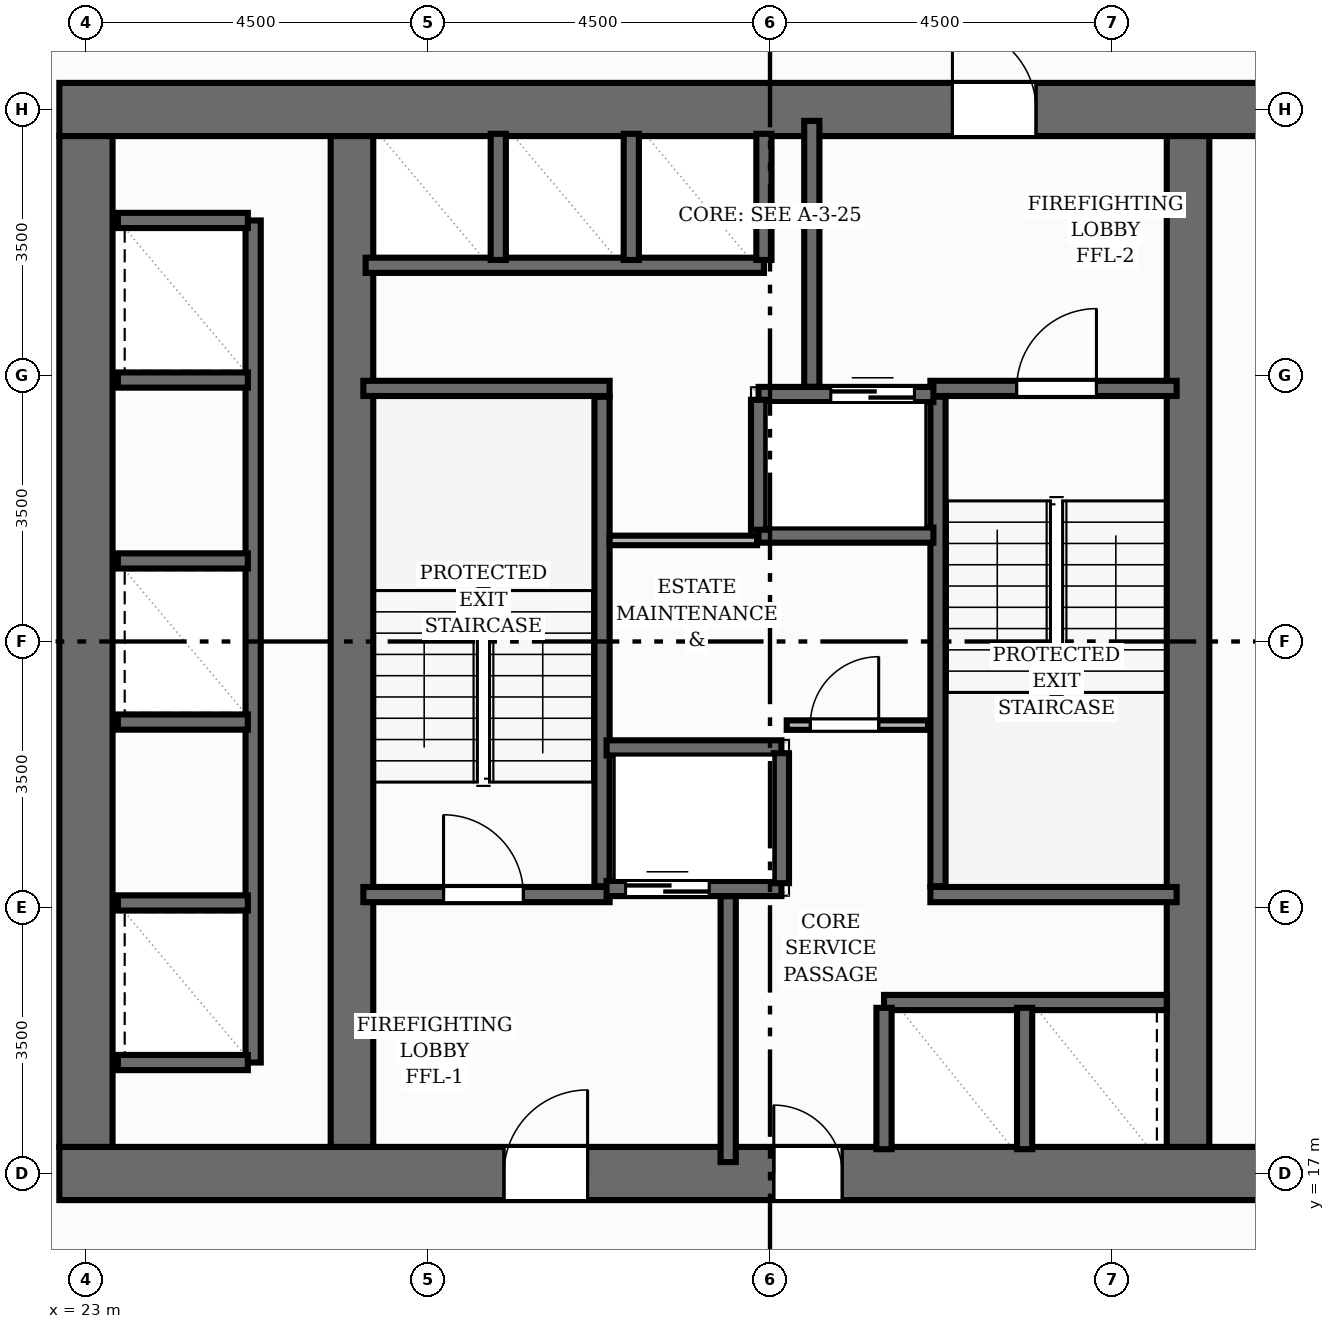
"""IFC4 building model, lengths in metres.
Left out: names, types, materials, properties, quantities, classifications, styles, units other than length and angle.
Written with IfcOpenShell. Run it as: python <this file> out.ifc"""

import sys

from ifc_helpers import new_model, si_unit, direction, frame, frame_2d, origin, place, context, subcontext, project, spatial, rectangle, extrude, element, fill, save


model = new_model("IFC4")
c1 = context("Model", 3, precision=1e-05, world=origin(), true_north=direction((0.0, 1.0)))
c2 = subcontext(c1, "Body", "Model", "MODEL_VIEW")
j1 = project(units=[si_unit("LENGTHUNIT", "METRE"), si_unit("PLANEANGLEUNIT", "RADIAN")], contexts=[c1])
p1 = place(None, origin())
s1 = spatial("IfcSite", under=j1, at=p1, CompositionType="ELEMENT")
p2 = place(p1, origin())
s2 = spatial("IfcBuilding", under=s1, at=p2, CompositionType="ELEMENT")
p3 = place(p2, frame((0.0, 0.0, 96.48)))
s3 = spatial("IfcBuildingStorey", under=s2, at=p3, CompositionType="ELEMENT", Elevation=96.48)
p4 = place(p3, frame((22.65, 17.0, 0.0), z_axis=(0.0, 0.0, 1.0), x_axis=(1.0, 0.0, 0.0)))
e1 = element("IfcWall", 1, at=p4, inside=s3, PredefinedType="SHEAR", context=c2, shape_type="SweptSolid", body=[
    extrude(rectangle(XDim=18.7, YDim=0.7, at=frame_2d((9.35, 0.0))), origin(), (0.0, 0.0, 1.0), 3.2),
])
p5 = place(p4, frame((5.85, 0.0, 0.0)))
e2 = element("IfcOpeningElement", 2, at=p5, cuts=e1, PredefinedType="OPENING", context=c2, shape_type="SweptSolid", body=[
    extrude(rectangle(XDim=1.1, YDim=2.15, at=frame_2d((0.55, 1.075))), frame((0.0, 0.36, 0.0), z_axis=(0.0, -1.0, 0.0), x_axis=(1.0, 0.0, 0.0)), (0.0, 0.0, 1.0), 0.72),
])
p6 = place(p4, frame((9.4, 0.0, 0.0)))
e3 = element("IfcOpeningElement", 3, at=p6, cuts=e1, PredefinedType="OPENING", context=c2, shape_type="SweptSolid", body=[
    extrude(rectangle(XDim=0.9, YDim=2.1, at=frame_2d((0.45, 1.05))), frame((0.0, 0.36, 0.0), z_axis=(0.0, -1.0, 0.0), x_axis=(1.0, 0.0, 0.0)), (0.0, 0.0, 1.0), 0.72),
])
p7 = place(p3, frame((22.65, 31.0, 0.0), z_axis=(0.0, 0.0, 1.0), x_axis=(1.0, 0.0, 0.0)))
e4 = element("IfcWall", 4, at=p7, inside=s3, PredefinedType="SHEAR", context=c2, shape_type="SweptSolid", body=[
    extrude(rectangle(XDim=18.7, YDim=0.7, at=frame_2d((9.35, 0.0))), origin(), (0.0, 0.0, 1.0), 3.2),
])
p8 = place(p7, frame((11.75, 0.0, 0.0)))
e5 = element("IfcOpeningElement", 5, at=p8, cuts=e4, PredefinedType="OPENING", context=c2, shape_type="SweptSolid", body=[
    extrude(rectangle(XDim=1.1, YDim=2.15, at=frame_2d((0.55, 1.075))), frame((0.0, 0.36, 0.0), z_axis=(0.0, -1.0, 0.0), x_axis=(1.0, 0.0, 0.0)), (0.0, 0.0, 1.0), 0.72),
])
p9 = place(p3, frame((23.0, 17.35, 0.0), z_axis=(0.0, 0.0, 1.0), x_axis=(0.0, 1.0, 0.0)))
e6 = element("IfcWall", 6, at=p9, inside=s3, PredefinedType="SHEAR", context=c2, shape_type="SweptSolid", body=[
    extrude(rectangle(XDim=13.3, YDim=0.7, at=frame_2d((6.65, 0.0))), origin(), (0.0, 0.0, 1.0), 3.2),
])
for number, where, z_axis, x_axis in (
    (7, (26.5, 17.35, 0.0), (0.0, 0.0, 1.0), (0.0, 1.0, 0.0)),
    (8, (37.5, 17.35, 0.0), (0.0, 0.0, 1.0), (0.0, 1.0, 0.0)),
):
    element("IfcWall", number, at=place(p3, frame(where, z_axis=z_axis, x_axis=x_axis)), inside=s3, PredefinedType="SHEAR", context=c2, shape_type="SweptSolid", body=[
        extrude(rectangle(XDim=13.3, YDim=0.56, at=frame_2d((6.65, 0.0))), origin(), (0.0, 0.0, 1.0), 3.2),
    ])
p10 = place(p3, frame((29.79, 20.78, 0.0), z_axis=(0.0, 0.0, 1.0), x_axis=(0.0, 1.0, 0.0)))
e9 = element("IfcWall", 9, at=p10, inside=s3, PredefinedType="SHEAR", context=c2, shape_type="SweptSolid", body=[
    extrude(rectangle(XDim=6.44, YDim=0.2, at=frame_2d((3.22, 0.0))), origin(), (0.0, 0.0, 1.0), 3.2),
])
p11 = place(p3, frame((26.65, 27.33, 0.0), z_axis=(0.0, 0.0, 1.0), x_axis=(1.0, 0.0, 0.0)))
e10 = element("IfcWall", 10, at=p11, inside=s3, PredefinedType="SHEAR", context=c2, shape_type="SweptSolid", body=[
    extrude(rectangle(XDim=3.24, YDim=0.2, at=frame_2d((1.62, 0.0))), origin(), (0.0, 0.0, 1.0), 3.2),
])
p12 = place(p3, frame((26.65, 20.67, 0.0), z_axis=(0.0, 0.0, 1.0), x_axis=(1.0, 0.0, 0.0)))
e11 = element("IfcWall", 11, at=p12, inside=s3, PredefinedType="SHEAR", context=c2, shape_type="SweptSolid", body=[
    extrude(rectangle(XDim=3.24, YDim=0.2, at=frame_2d((1.62, 0.0))), origin(), (0.0, 0.0, 1.0), 3.2),
])
p13 = place(p12, frame((1.055, 0.0, 0.0)))
e12 = element("IfcOpeningElement", 12, at=p13, cuts=e11, PredefinedType="OPENING", context=c2, shape_type="SweptSolid", body=[
    extrude(rectangle(XDim=1.05, YDim=2.15, at=frame_2d((0.525, 1.075))), frame((0.0, 0.11, 0.0), z_axis=(0.0, -1.0, 0.0), x_axis=(1.0, 0.0, 0.0)), (0.0, 0.0, 1.0), 0.22),
])
p14 = place(p3, frame((34.21, 20.78, 0.0), z_axis=(0.0, 0.0, 1.0), x_axis=(0.0, 1.0, 0.0)))
e13 = element("IfcWall", 13, at=p14, inside=s3, PredefinedType="SHEAR", context=c2, shape_type="SweptSolid", body=[
    extrude(rectangle(XDim=6.44, YDim=0.2, at=frame_2d((3.22, 0.0))), origin(), (0.0, 0.0, 1.0), 3.2),
])
p15 = place(p3, frame((34.11, 20.67, 0.0), z_axis=(0.0, 0.0, 1.0), x_axis=(1.0, 0.0, 0.0)))
e14 = element("IfcWall", 14, at=p15, inside=s3, PredefinedType="SHEAR", context=c2, shape_type="SweptSolid", body=[
    extrude(rectangle(XDim=3.24, YDim=0.2, at=frame_2d((1.62, 0.0))), origin(), (0.0, 0.0, 1.0), 3.2),
])
p16 = place(p3, frame((34.11, 27.33, 0.0), z_axis=(0.0, 0.0, 1.0), x_axis=(1.0, 0.0, 0.0)))
e15 = element("IfcWall", 15, at=p16, inside=s3, PredefinedType="SHEAR", context=c2, shape_type="SweptSolid", body=[
    extrude(rectangle(XDim=3.24, YDim=0.2, at=frame_2d((1.62, 0.0))), origin(), (0.0, 0.0, 1.0), 3.2),
])
p17 = place(p16, frame((1.135, 0.0, 0.0)))
e16 = element("IfcOpeningElement", 16, at=p17, cuts=e15, PredefinedType="OPENING", context=c2, shape_type="SweptSolid", body=[
    extrude(rectangle(XDim=1.05, YDim=2.15, at=frame_2d((0.525, 1.075))), frame((0.0, 0.11, 0.0), z_axis=(0.0, -1.0, 0.0), x_axis=(1.0, 0.0, 0.0)), (0.0, 0.0, 1.0), 0.22),
])
for number, where, z_axis, x_axis in (
    (17, (31.45, 17.15, 0.0), (0.0, 0.0, 1.0), (0.0, 1.0, 0.0)),
    (18, (32.55, 27.35, 0.0), (0.0, 0.0, 1.0), (0.0, 1.0, 0.0)),
):
    element("IfcWall", number, at=place(p3, frame(where, z_axis=z_axis, x_axis=x_axis)), inside=s3, PredefinedType="SHEAR", context=c2, shape_type="SweptSolid", body=[
        extrude(rectangle(XDim=3.5, YDim=0.2, at=frame_2d((1.75, 0.0))), origin(), (0.0, 0.0, 1.0), 3.2),
    ])
p18 = place(p3, frame((29.85, 20.75, 0.0), z_axis=(0.0, 0.0, 1.0), x_axis=(1.0, 0.0, 0.0)))
e19 = element("IfcWall", 19, at=p18, inside=s3, PredefinedType="SHEAR", context=c2, shape_type="SweptSolid", body=[
    extrude(rectangle(XDim=2.3, YDim=0.2, at=frame_2d((1.15, 0.0))), origin(), (0.0, 0.0, 1.0), 3.2),
])
p19 = place(p18, frame((0.25, 0.0, 0.0)))
e20 = element("IfcOpeningElement", 20, at=p19, cuts=e19, PredefinedType="OPENING", context=c2, shape_type="SweptSolid", body=[
    extrude(rectangle(XDim=1.1, YDim=2.15, at=frame_2d((0.55, 1.075))), frame((0.0, 0.11, 0.0), z_axis=(0.0, -1.0, 0.0), x_axis=(1.0, 0.0, 0.0)), (0.0, 0.0, 1.0), 0.22),
])
p20 = place(p3, frame((29.85, 22.6, 0.0), z_axis=(0.0, 0.0, 1.0), x_axis=(1.0, 0.0, 0.0)))
e21 = element("IfcWall", 21, at=p20, inside=s3, PredefinedType="SHEAR", context=c2, shape_type="SweptSolid", body=[
    extrude(rectangle(XDim=2.3, YDim=0.2, at=frame_2d((1.15, 0.0))), origin(), (0.0, 0.0, 1.0), 3.2),
])
p21 = place(p3, frame((32.15, 20.82, 0.0), z_axis=(0.0, 0.0, 1.0), x_axis=(0.0, 1.0, 0.0)))
e22 = element("IfcWall", 22, at=p21, inside=s3, PredefinedType="SHEAR", context=c2, shape_type="SweptSolid", body=[
    extrude(rectangle(XDim=1.71, YDim=0.2, at=frame_2d((0.855, 0.0))), origin(), (0.0, 0.0, 1.0), 3.2),
])
p22 = place(p3, frame((31.85, 27.25, 0.0), z_axis=(0.0, 0.0, 1.0), x_axis=(1.0, 0.0, 0.0)))
e23 = element("IfcWall", 23, at=p22, inside=s3, PredefinedType="SHEAR", context=c2, shape_type="SweptSolid", body=[
    extrude(rectangle(XDim=2.3, YDim=0.2, at=frame_2d((1.15, 0.0))), origin(), (0.0, 0.0, 1.0), 3.2),
])
p23 = place(p22, frame((0.95, 0.0, 0.0)))
e24 = element("IfcOpeningElement", 24, at=p23, cuts=e23, PredefinedType="OPENING", context=c2, shape_type="SweptSolid", body=[
    extrude(rectangle(XDim=1.1, YDim=2.15, at=frame_2d((0.55, 1.075))), frame((0.0, 0.11, 0.0), z_axis=(0.0, -1.0, 0.0), x_axis=(1.0, 0.0, 0.0)), (0.0, 0.0, 1.0), 0.22),
])
p24 = place(p3, frame((31.85, 25.4, 0.0), z_axis=(0.0, 0.0, 1.0), x_axis=(1.0, 0.0, 0.0)))
e25 = element("IfcWall", 25, at=p24, inside=s3, PredefinedType="SHEAR", context=c2, shape_type="SweptSolid", body=[
    extrude(rectangle(XDim=2.3, YDim=0.2, at=frame_2d((1.15, 0.0))), origin(), (0.0, 0.0, 1.0), 3.2),
])
p25 = place(p3, frame((31.85, 25.47, 0.0), z_axis=(0.0, 0.0, 1.0), x_axis=(0.0, 1.0, 0.0)))
e26 = element("IfcWall", 26, at=p25, inside=s3, PredefinedType="SHEAR", context=c2, shape_type="SweptSolid", body=[
    extrude(rectangle(XDim=1.71, YDim=0.2, at=frame_2d((0.855, 0.0))), origin(), (0.0, 0.0, 1.0), 3.2),
])
p26 = place(p3, frame((25.2, 18.46, 0.0), z_axis=(0.0, 0.0, 1.0), x_axis=(0.0, 1.0, 0.0)))
e27 = element("IfcWall", 27, at=p26, inside=s3, PredefinedType="SHEAR", context=c2, shape_type="SweptSolid", body=[
    extrude(rectangle(XDim=11.08, YDim=0.2, at=frame_2d((5.54, 0.0))), origin(), (0.0, 0.0, 1.0), 3.2),
])
for number, where, z_axis, x_axis in (
    (28, (23.42, 18.46, 0.0), (0.0, 0.0, 1.0), (1.0, 0.0, 0.0)),
    (29, (23.42, 29.54, 0.0), (0.0, 0.0, 1.0), (1.0, 0.0, 0.0)),
    (30, (23.42, 20.56, 0.0), (0.0, 0.0, 1.0), (1.0, 0.0, 0.0)),
    (31, (23.42, 22.94, 0.0), (0.0, 0.0, 1.0), (1.0, 0.0, 0.0)),
    (32, (23.42, 25.06, 0.0), (0.0, 0.0, 1.0), (1.0, 0.0, 0.0)),
    (33, (23.42, 27.44, 0.0), (0.0, 0.0, 1.0), (1.0, 0.0, 0.0)),
):
    element("IfcWall", number, at=place(p3, frame(where, z_axis=z_axis, x_axis=x_axis)), inside=s3, PredefinedType="SHEAR", context=c2, shape_type="SweptSolid", body=[
        extrude(rectangle(XDim=1.71, YDim=0.2, at=frame_2d((0.855, 0.0))), origin(), (0.0, 0.0, 1.0), 3.2),
    ])
p27 = place(p3, frame((26.68, 28.95, 0.0), z_axis=(0.0, 0.0, 1.0), x_axis=(1.0, 0.0, 0.0)))
e34 = element("IfcWall", 34, at=p27, inside=s3, PredefinedType="SHEAR", context=c2, shape_type="SweptSolid", body=[
    extrude(rectangle(XDim=5.24, YDim=0.2, at=frame_2d((2.62, 0.0))), origin(), (0.0, 0.0, 1.0), 3.2),
])
for number, where, z_axis, x_axis in (
    (35, (31.92, 29.02, 0.0), (0.0, 0.0, 1.0), (0.0, 1.0, 0.0)),
    (36, (28.425, 29.02, 0.0), (0.0, 0.0, 1.0), (0.0, 1.0, 0.0)),
    (37, (30.175, 29.02, 0.0), (0.0, 0.0, 1.0), (0.0, 1.0, 0.0)),
):
    element("IfcWall", number, at=place(p3, frame(where, z_axis=z_axis, x_axis=x_axis)), inside=s3, PredefinedType="SHEAR", context=c2, shape_type="SweptSolid", body=[
        extrude(rectangle(XDim=1.66, YDim=0.2, at=frame_2d((0.83, 0.0))), origin(), (0.0, 0.0, 1.0), 3.2),
    ])
p28 = place(p3, frame((33.5, 19.25, 0.0), z_axis=(0.0, 0.0, 1.0), x_axis=(1.0, 0.0, 0.0)))
e38 = element("IfcWall", 38, at=p28, inside=s3, PredefinedType="SHEAR", context=c2, shape_type="SweptSolid", body=[
    extrude(rectangle(XDim=3.72, YDim=0.2, at=frame_2d((1.86, 0.0))), origin(), (0.0, 0.0, 1.0), 3.2),
])
for number, where, z_axis, x_axis in (
    (39, (33.5, 17.32, 0.0), (0.0, 0.0, 1.0), (0.0, 1.0, 0.0)),
    (40, (35.35, 17.32, 0.0), (0.0, 0.0, 1.0), (0.0, 1.0, 0.0)),
):
    element("IfcWall", number, at=place(p3, frame(where, z_axis=z_axis, x_axis=x_axis)), inside=s3, PredefinedType="SHEAR", context=c2, shape_type="SweptSolid", body=[
        extrude(rectangle(XDim=1.86, YDim=0.2, at=frame_2d((0.93, 0.0))), origin(), (0.0, 0.0, 1.0), 3.2),
    ])
p29 = place(p3, frame((32.22, 22.9, 0.0), z_axis=(0.0, 0.0, 1.0), x_axis=(1.0, 0.0, 0.0)))
e41 = element("IfcWall", 41, at=p29, inside=s3, PredefinedType="PARTITIONING", context=c2, shape_type="SweptSolid", body=[
    extrude(rectangle(XDim=1.86, YDim=0.125, at=frame_2d((0.93, 0.0))), origin(), (0.0, 0.0, 1.0), 2.955),
])
p30 = place(p29, frame((0.31, 0.0, 0.0)))
e42 = element("IfcOpeningElement", 42, at=p30, cuts=e41, PredefinedType="OPENING", context=c2, shape_type="SweptSolid", body=[
    extrude(rectangle(XDim=0.9, YDim=2.1, at=frame_2d((0.45, 1.05))), frame((0.0, 0.073, 0.0), z_axis=(0.0, -1.0, 0.0), x_axis=(1.0, 0.0, 0.0)), (0.0, 0.0, 1.0), 0.145),
])
p31 = place(p3, frame((29.89, 25.33, 0.0), z_axis=(0.0, 0.0, 1.0), x_axis=(1.0, 0.0, 0.0)))
e43 = element("IfcWall", 43, at=p31, inside=s3, PredefinedType="PARTITIONING", context=c2, shape_type="SweptSolid", body=[
    extrude(rectangle(XDim=1.94, YDim=0.125, at=frame_2d((0.97, 0.0))), origin(), (0.0, 0.0, 1.0), 2.955),
])
p32 = place(p13, origin())
e44 = element("IfcDoor", 44, at=p32, inside=s3, OperationType="SINGLE_SWING_LEFT", PredefinedType="DOOR", context=c2, shape_type="SweptSolid", body=[
    extrude(rectangle(XDim=1.05, YDim=2.15, at=frame_2d((0.525, 1.075))), frame((0.0, 0.025, 0.0), z_axis=(0.0, -1.0, 0.0), x_axis=(1.0, 0.0, 0.0)), (0.0, 0.0, 1.0), 0.05),
])
fill(e12, e44)
p33 = place(p17, origin())
e45 = element("IfcDoor", 45, at=p33, inside=s3, OperationType="SINGLE_SWING_RIGHT", PredefinedType="DOOR", context=c2, shape_type="SweptSolid", body=[
    extrude(rectangle(XDim=1.05, YDim=2.15, at=frame_2d((0.525, 1.075))), frame((0.0, 0.025, 0.0), z_axis=(0.0, -1.0, 0.0), x_axis=(1.0, 0.0, 0.0)), (0.0, 0.0, 1.0), 0.05),
])
fill(e16, e45)
p34 = place(p5, origin())
e46 = element("IfcDoor", 46, at=p34, inside=s3, OperationType="SINGLE_SWING_RIGHT", PredefinedType="DOOR", context=c2, shape_type="SweptSolid", body=[
    extrude(rectangle(XDim=1.1, YDim=2.15, at=frame_2d((0.55, 1.075))), frame((0.0, 0.025, 0.0), z_axis=(0.0, -1.0, 0.0), x_axis=(1.0, 0.0, 0.0)), (0.0, 0.0, 1.0), 0.05),
])
fill(e2, e46)
p35 = place(p8, origin())
e47 = element("IfcDoor", 47, at=p35, inside=s3, OperationType="SINGLE_SWING_LEFT", PredefinedType="DOOR", context=c2, shape_type="SweptSolid", body=[
    extrude(rectangle(XDim=1.1, YDim=2.15, at=frame_2d((0.55, 1.075))), frame((0.0, 0.025, 0.0), z_axis=(0.0, -1.0, 0.0), x_axis=(1.0, 0.0, 0.0)), (0.0, 0.0, 1.0), 0.05),
])
fill(e5, e47)
p36 = place(p19, origin())
e48 = element("IfcDoor", 48, at=p36, inside=s3, OperationType="DOUBLE_DOOR_SLIDING", PredefinedType="DOOR", context=c2, shape_type="SweptSolid", body=[
    extrude(rectangle(XDim=1.1, YDim=2.15, at=frame_2d((0.55, 1.075))), frame((0.0, 0.025, 0.0), z_axis=(0.0, -1.0, 0.0), x_axis=(1.0, 0.0, 0.0)), (0.0, 0.0, 1.0), 0.05),
])
fill(e20, e48)
p37 = place(p23, origin())
e49 = element("IfcDoor", 49, at=p37, inside=s3, OperationType="DOUBLE_DOOR_SLIDING", PredefinedType="DOOR", context=c2, shape_type="SweptSolid", body=[
    extrude(rectangle(XDim=1.1, YDim=2.15, at=frame_2d((0.55, 1.075))), frame((0.0, 0.025, 0.0), z_axis=(0.0, -1.0, 0.0), x_axis=(1.0, 0.0, 0.0)), (0.0, 0.0, 1.0), 0.05),
])
fill(e24, e49)
p38 = place(p6, origin())
e50 = element("IfcDoor", 50, at=p38, inside=s3, OperationType="SINGLE_SWING_LEFT", PredefinedType="DOOR", context=c2, shape_type="SweptSolid", body=[
    extrude(rectangle(XDim=0.9, YDim=2.1, at=frame_2d((0.45, 1.05))), frame((0.0, 0.025, 0.0), z_axis=(0.0, -1.0, 0.0), x_axis=(1.0, 0.0, 0.0)), (0.0, 0.0, 1.0), 0.05),
])
fill(e3, e50)
p39 = place(p30, origin())
e51 = element("IfcDoor", 51, at=p39, inside=s3, OperationType="SINGLE_SWING_RIGHT", PredefinedType="DOOR", context=c2, shape_type="SweptSolid", body=[
    extrude(rectangle(XDim=0.9, YDim=2.1, at=frame_2d((0.45, 1.05))), frame((0.0, 0.025, 0.0), z_axis=(0.0, -1.0, 0.0), x_axis=(1.0, 0.0, 0.0)), (0.0, 0.0, 1.0), 0.05),
])
fill(e42, e51)
save(model, sys.argv[1])
